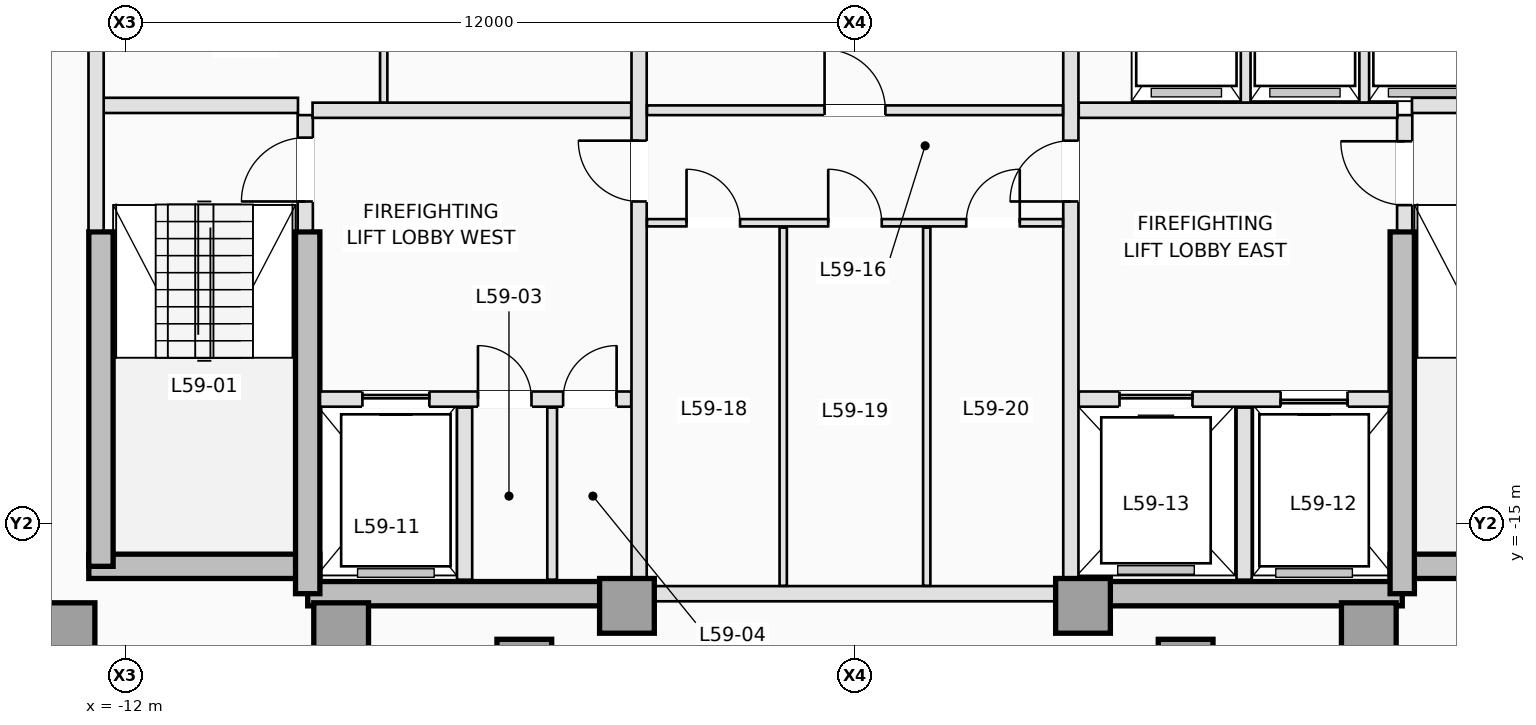
"""IFC4 building model, lengths in metres.
Left out: names, types, materials, properties, quantities, classifications, styles, units other than length and angle.
Written with IfcOpenShell. Run it as: python <this file> out.ifc"""

import sys

from ifc_helpers import new_model, si_unit, direction, frame, frame_2d, origin, origin_2d, place, context, subcontext, project, spatial, rectangle, extrude, element, fill, save


model = new_model("IFC4")
c1 = context("Model", 3, precision=1e-05, world=origin(), true_north=direction((0.0, 1.0)))
c2 = subcontext(c1, "Body", "Model", "MODEL_VIEW")
j1 = project(units=[si_unit("LENGTHUNIT", "METRE"), si_unit("PLANEANGLEUNIT", "RADIAN")], contexts=[c1])
p1 = place(None, origin())
s1 = spatial("IfcSite", under=j1, at=p1, CompositionType="ELEMENT")
p2 = place(p1, origin())
s2 = spatial("IfcBuilding", under=s1, at=p2, CompositionType="ELEMENT")
p3 = place(p2, frame((0.0, 0.0, 214.9)))
s3 = spatial("IfcBuildingStorey", under=s2, at=p3, CompositionType="ELEMENT", Elevation=214.9)
p4 = place(p3, frame((-12.6, -15.7, 0.0), z_axis=(0.0, 0.0, 1.0), x_axis=(1.0, 0.0, 0.0)))
e1 = element("IfcWall", 1, at=p4, inside=s3, PredefinedType="SHEAR", context=c2, shape_type="SweptSolid", body=[
    extrude(rectangle(XDim=3.8, YDim=0.4, at=frame_2d((1.9, 0.0))), origin(), (0.0, 0.0, 1.0), 3.5),
])
for number, where, z_axis, x_axis in (
    (2, (-9.0, -16.15, 0.0), (0.0, 0.0, 1.0), (1.0, 0.0, 0.0)),
    (3, (3.75, -16.15, 0.0), (0.0, 0.0, 1.0), (1.0, 0.0, 0.0)),
):
    element("IfcWall", number, at=place(p3, frame(where, z_axis=z_axis, x_axis=x_axis)), inside=s3, PredefinedType="SHEAR", context=c2, shape_type="SweptSolid", body=[
        extrude(rectangle(XDim=5.25, YDim=0.4, at=frame_2d((2.625, 0.0))), origin(), (0.0, 0.0, 1.0), 3.5),
    ])
p5 = place(p3, frame((8.8, -15.7, 0.0), z_axis=(0.0, 0.0, 1.0), x_axis=(1.0, 0.0, 0.0)))
e4 = element("IfcWall", 4, at=p5, inside=s3, PredefinedType="SHEAR", context=c2, shape_type="SweptSolid", body=[
    extrude(rectangle(XDim=3.8, YDim=0.4, at=frame_2d((1.9, 0.0))), origin(), (0.0, 0.0, 1.0), 3.5),
])
p6 = place(p3, frame((-12.4, -15.7, 0.0), z_axis=(0.0, 0.0, 1.0), x_axis=(0.0, 1.0, 0.0)))
e5 = element("IfcWall", 5, at=p6, inside=s3, PredefinedType="SHEAR", context=c2, shape_type="SweptSolid", body=[
    extrude(rectangle(XDim=5.5, YDim=0.4, at=frame_2d((2.75, 0.0))), origin(), (0.0, 0.0, 1.0), 3.5),
])
for number, where, z_axis, x_axis in (
    (6, (-9.0, -16.15, 0.0), (0.0, 0.0, 1.0), (0.0, 1.0, 0.0)),
    (7, (9.0, -16.15, 0.0), (0.0, 0.0, 1.0), (0.0, 1.0, 0.0)),
):
    element("IfcWall", number, at=place(p3, frame(where, z_axis=z_axis, x_axis=x_axis)), inside=s3, PredefinedType="SHEAR", context=c2, shape_type="SweptSolid", body=[
        extrude(rectangle(XDim=5.95, YDim=0.4, at=frame_2d((2.975, 0.0))), origin(), (0.0, 0.0, 1.0), 3.5),
    ])
for number, where, z_axis, x_axis in (
    (8, (-12.95, -16.75, 0.0), (0.0, 0.0, 1.0), (1.0, 0.0, 0.0)),
    (9, (-8.45, -16.75, 0.0), (0.0, 0.0, 1.0), (1.0, 0.0, 0.0)),
    (10, (-3.75, -16.35, 0.0), (0.0, 0.0, 1.0), (1.0, 0.0, 0.0)),
    (11, (3.75, -16.35, 0.0), (0.0, 0.0, 1.0), (1.0, 0.0, 0.0)),
    (12, (8.45, -16.75, 0.0), (0.0, 0.0, 1.0), (1.0, 0.0, 0.0)),
    (13, (-5.438, -17.35, 0.0), (0.0, 0.0, 1.0), (0.0, 1.0, 0.0)),
    (14, (5.438, -17.35, 0.0), (0.0, 0.0, 1.0), (0.0, 1.0, 0.0)),
):
    element("IfcColumn", number, at=place(p3, frame(where, z_axis=z_axis, x_axis=x_axis)), inside=s3, PredefinedType="COLUMN", context=c2, shape_type="SweptSolid", body=[
        extrude(rectangle(XDim=0.9, YDim=0.9, at=origin_2d()), origin(), (0.0, 0.0, 1.0), 3.5),
    ])
p7 = place(p3, frame((-9.04, -10.18, 0.0), z_axis=(0.0, 0.0, 1.0), x_axis=(0.0, 1.0, 0.0)))
e15 = element("IfcWall", 15, at=p7, inside=s3, PredefinedType="PARTITIONING", context=c2, shape_type="SweptSolid", body=[
    extrude(rectangle(XDim=1.9, YDim=0.25, at=frame_2d((0.95, 0.0))), origin(), (0.0, 0.0, 1.0), 3.25),
])
p8 = place(p7, frame((0.48, 0.0, 0.0)))
e16 = element("IfcOpeningElement", 16, at=p8, cuts=e15, PredefinedType="OPENING", context=c2, shape_type="SweptSolid", body=[
    extrude(rectangle(XDim=1.05, YDim=2.15, at=frame_2d((0.525, 1.075))), frame((0.0, 0.135, 0.0), z_axis=(0.0, -1.0, 0.0), x_axis=(1.0, 0.0, 0.0)), (0.0, 0.0, 1.0), 0.27),
])
p9 = place(p3, frame((9.04, -10.18, 0.0), z_axis=(0.0, 0.0, 1.0), x_axis=(0.0, 1.0, 0.0)))
e17 = element("IfcWall", 17, at=p9, inside=s3, PredefinedType="PARTITIONING", context=c2, shape_type="SweptSolid", body=[
    extrude(rectangle(XDim=1.9, YDim=0.25, at=frame_2d((0.95, 0.0))), origin(), (0.0, 0.0, 1.0), 3.25),
])
p10 = place(p9, frame((0.42, 0.0, 0.0)))
e18 = element("IfcOpeningElement", 18, at=p10, cuts=e17, PredefinedType="OPENING", context=c2, shape_type="SweptSolid", body=[
    extrude(rectangle(XDim=1.05, YDim=2.15, at=frame_2d((0.525, 1.075))), frame((0.0, 0.135, 0.0), z_axis=(0.0, -1.0, 0.0), x_axis=(1.0, 0.0, 0.0)), (0.0, 0.0, 1.0), 0.27),
])
for number, where, z_axis, x_axis in (
    (19, (-12.38, -8.12, 0.0), (0.0, 0.0, 1.0), (1.0, 0.0, 0.0)),
    (20, (9.16, -8.12, 0.0), (0.0, 0.0, 1.0), (1.0, 0.0, 0.0)),
):
    element("IfcWall", number, at=place(p3, frame(where, z_axis=z_axis, x_axis=x_axis)), inside=s3, PredefinedType="PARTITIONING", context=c2, shape_type="SweptSolid", body=[
        extrude(rectangle(XDim=3.22, YDim=0.25, at=frame_2d((1.61, 0.0))), origin(), (0.0, 0.0, 1.0), 3.25),
    ])
p11 = place(p3, frame((-12.48, -10.18, 0.0), z_axis=(0.0, 0.0, 1.0), x_axis=(0.0, 1.0, 0.0)))
e21 = element("IfcWall", 21, at=p11, inside=s3, PredefinedType="PARTITIONING", context=c2, shape_type="SweptSolid", body=[
    extrude(rectangle(XDim=4.84, YDim=0.25, at=frame_2d((2.42, 0.0))), origin(), (0.0, 0.0, 1.0), 3.25),
])
p12 = place(p3, frame((-8.798, -12.95, 0.0), z_axis=(0.0, 0.0, 1.0), x_axis=(1.0, 0.0, 0.0)))
e22 = element("IfcWall", 22, at=p12, inside=s3, PredefinedType="PARTITIONING", context=c2, shape_type="SweptSolid", body=[
    extrude(rectangle(XDim=5.118, YDim=0.25, at=frame_2d((2.559, 0.0))), origin(), (0.0, 0.0, 1.0), 3.25),
])
p13 = place(p12, frame((0.698, 0.0, 0.0)))
e23 = element("IfcOpeningElement", 23, at=p13, cuts=e22, PredefinedType="OPENING", context=c2, shape_type="SweptSolid", body=[
    extrude(rectangle(XDim=1.1, YDim=2.15, at=frame_2d((0.55, 1.075))), frame((0.0, 0.135, 0.0), z_axis=(0.0, -1.0, 0.0), x_axis=(1.0, 0.0, 0.0)), (0.0, 0.0, 1.0), 0.27),
])
p14 = place(p12, frame((2.598, 0.0, 0.0)))
e24 = element("IfcOpeningElement", 24, at=p14, cuts=e22, PredefinedType="OPENING", context=c2, shape_type="SweptSolid", body=[
    extrude(rectangle(XDim=0.88, YDim=2.1, at=frame_2d((0.44, 1.05))), frame((0.0, 0.135, 0.0), z_axis=(0.0, -1.0, 0.0), x_axis=(1.0, 0.0, 0.0)), (0.0, 0.0, 1.0), 0.27),
])
p15 = place(p12, frame((3.998, 0.0, 0.0)))
e25 = element("IfcOpeningElement", 25, at=p15, cuts=e22, PredefinedType="OPENING", context=c2, shape_type="SweptSolid", body=[
    extrude(rectangle(XDim=0.88, YDim=2.1, at=frame_2d((0.44, 1.05))), frame((0.0, 0.135, 0.0), z_axis=(0.0, -1.0, 0.0), x_axis=(1.0, 0.0, 0.0)), (0.0, 0.0, 1.0), 0.27),
])
p16 = place(p3, frame((3.68, -12.95, 0.0), z_axis=(0.0, 0.0, 1.0), x_axis=(1.0, 0.0, 0.0)))
e26 = element("IfcWall", 26, at=p16, inside=s3, PredefinedType="PARTITIONING", context=c2, shape_type="SweptSolid", body=[
    extrude(rectangle(XDim=5.118, YDim=0.25, at=frame_2d((2.559, 0.0))), origin(), (0.0, 0.0, 1.0), 3.25),
])
p17 = place(p16, frame((3.32, 0.0, 0.0)))
e27 = element("IfcOpeningElement", 27, at=p17, cuts=e26, PredefinedType="OPENING", context=c2, shape_type="SweptSolid", body=[
    extrude(rectangle(XDim=1.1, YDim=2.15, at=frame_2d((0.55, 1.075))), frame((0.0, 0.135, 0.0), z_axis=(0.0, -1.0, 0.0), x_axis=(1.0, 0.0, 0.0)), (0.0, 0.0, 1.0), 0.27),
])
p18 = place(p16, frame((0.67, 0.0, 0.0)))
e28 = element("IfcOpeningElement", 28, at=p18, cuts=e26, PredefinedType="OPENING", context=c2, shape_type="SweptSolid", body=[
    extrude(rectangle(XDim=1.2, YDim=2.15, at=frame_2d((0.6, 1.075))), frame((0.0, 0.135, 0.0), z_axis=(0.0, -1.0, 0.0), x_axis=(1.0, 0.0, 0.0)), (0.0, 0.0, 1.0), 0.27),
])
p19 = place(p3, frame((-6.42, -15.92, 0.0), z_axis=(0.0, 0.0, 1.0), x_axis=(0.0, 1.0, 0.0)))
e29 = element("IfcWall", 29, at=p19, inside=s3, PredefinedType="PARTITIONING", context=c2, shape_type="SweptSolid", body=[
    extrude(rectangle(XDim=2.83, YDim=0.25, at=frame_2d((1.415, 0.0))), origin(), (0.0, 0.0, 1.0), 3.25),
])
p20 = place(p3, frame((-4.98, -15.92, 0.0), z_axis=(0.0, 0.0, 1.0), x_axis=(0.0, 1.0, 0.0)))
e30 = element("IfcWall", 30, at=p20, inside=s3, PredefinedType="PARTITIONING", context=c2, shape_type="SweptSolid", body=[
    extrude(rectangle(XDim=2.83, YDim=0.16, at=frame_2d((1.415, 0.0))), origin(), (0.0, 0.0, 1.0), 3.25),
])
p21 = place(p3, frame((6.4, -15.92, 0.0), z_axis=(0.0, 0.0, 1.0), x_axis=(0.0, 1.0, 0.0)))
e31 = element("IfcWall", 31, at=p21, inside=s3, PredefinedType="PARTITIONING", context=c2, shape_type="SweptSolid", body=[
    extrude(rectangle(XDim=2.83, YDim=0.25, at=frame_2d((1.415, 0.0))), origin(), (0.0, 0.0, 1.0), 3.25),
])
for number, where, z_axis, x_axis in (
    (32, (-8.92, -8.2, 0.0), (0.0, 0.0, 1.0), (1.0, 0.0, 0.0)),
    (33, (3.68, -8.2, 0.0), (0.0, 0.0, 1.0), (1.0, 0.0, 0.0)),
):
    element("IfcWall", number, at=place(p3, frame(where, z_axis=z_axis, x_axis=x_axis)), inside=s3, PredefinedType="PARTITIONING", context=c2, shape_type="SweptSolid", body=[
        extrude(rectangle(XDim=5.24, YDim=0.25, at=frame_2d((2.62, 0.0))), origin(), (0.0, 0.0, 1.0), 3.25),
    ])
p22 = place(p3, frame((-3.55, -15.898, 0.0), z_axis=(0.0, 0.0, 1.0), x_axis=(0.0, 1.0, 0.0)))
e34 = element("IfcWall", 34, at=p22, inside=s3, PredefinedType="PARTITIONING", context=c2, shape_type="SweptSolid", body=[
    extrude(rectangle(XDim=10.558, YDim=0.25, at=frame_2d((5.279, 0.0))), origin(), (0.0, 0.0, 1.0), 3.25),
])
p23 = place(p22, frame((6.198, 0.0, 0.0)))
e35 = element("IfcOpeningElement", 35, at=p23, cuts=e34, PredefinedType="OPENING", context=c2, shape_type="SweptSolid", body=[
    extrude(rectangle(XDim=1.0, YDim=2.15, at=frame_2d((0.5, 1.075))), frame((0.0, 0.135, 0.0), z_axis=(0.0, -1.0, 0.0), x_axis=(1.0, 0.0, 0.0)), (0.0, 0.0, 1.0), 0.27),
])
p24 = place(p3, frame((3.55, -15.898, 0.0), z_axis=(0.0, 0.0, 1.0), x_axis=(0.0, 1.0, 0.0)))
e36 = element("IfcWall", 36, at=p24, inside=s3, PredefinedType="PARTITIONING", context=c2, shape_type="SweptSolid", body=[
    extrude(rectangle(XDim=10.558, YDim=0.25, at=frame_2d((5.279, 0.0))), origin(), (0.0, 0.0, 1.0), 3.25),
])
p25 = place(p24, frame((6.198, 0.0, 0.0)))
e37 = element("IfcOpeningElement", 37, at=p25, cuts=e36, PredefinedType="OPENING", context=c2, shape_type="SweptSolid", body=[
    extrude(rectangle(XDim=1.0, YDim=2.15, at=frame_2d((0.5, 1.075))), frame((0.0, 0.135, 0.0), z_axis=(0.0, -1.0, 0.0), x_axis=(1.0, 0.0, 0.0)), (0.0, 0.0, 1.0), 0.27),
])
p26 = place(p3, frame((-7.75, -8.073, 0.0), z_axis=(0.0, 0.0, 1.0), x_axis=(0.0, 1.0, 0.0)))
e38 = element("IfcWall", 38, at=p26, inside=s3, PredefinedType="PARTITIONING", context=c2, shape_type="SweptSolid", body=[
    extrude(rectangle(XDim=2.733, YDim=0.12, at=frame_2d((1.366, 0.0))), origin(), (0.0, 0.0, 1.0), 3.25),
])
for number, where, z_axis, x_axis in (
    (39, (6.425, -8.073, 0.0), (0.0, 0.0, 1.0), (0.0, 1.0, 0.0)),
    (40, (8.375, -8.073, 0.0), (0.0, 0.0, 1.0), (0.0, 1.0, 0.0)),
):
    element("IfcWall", number, at=place(p3, frame(where, z_axis=z_axis, x_axis=x_axis)), inside=s3, PredefinedType="PARTITIONING", context=c2, shape_type="SweptSolid", body=[
        extrude(rectangle(XDim=2.733, YDim=0.16, at=frame_2d((1.366, 0.0))), origin(), (0.0, 0.0, 1.0), 3.25),
    ])
p27 = place(p3, frame((-3.298, -16.15, 0.0), z_axis=(0.0, 0.0, 1.0), x_axis=(1.0, 0.0, 0.0)))
e41 = element("IfcWall", 41, at=p27, inside=s3, PredefinedType="PARTITIONING", context=c2, shape_type="SweptSolid", body=[
    extrude(rectangle(XDim=6.596, YDim=0.25, at=frame_2d((3.298, 0.0))), origin(), (0.0, 0.0, 1.0), 2.45),
])
p28 = place(p3, frame((-3.42, -8.2, 0.0), z_axis=(0.0, 0.0, 1.0), x_axis=(1.0, 0.0, 0.0)))
e42 = element("IfcWall", 42, at=p28, inside=s3, PredefinedType="PARTITIONING", context=c2, shape_type="SweptSolid", body=[
    extrude(rectangle(XDim=6.84, YDim=0.16, at=frame_2d((3.42, 0.0))), origin(), (0.0, 0.0, 1.0), 3.25),
])
p29 = place(p28, frame((2.92, 0.0, 0.0)))
e43 = element("IfcOpeningElement", 43, at=p29, cuts=e42, PredefinedType="OPENING", context=c2, shape_type="SweptSolid", body=[
    extrude(rectangle(XDim=1.0, YDim=2.15, at=frame_2d((0.5, 1.075))), frame((0.0, 0.09, 0.0), z_axis=(0.0, -1.0, 0.0), x_axis=(1.0, 0.0, 0.0)), (0.0, 0.0, 1.0), 0.18),
])
p30 = place(p3, frame((-3.42, -10.05, 0.0), z_axis=(0.0, 0.0, 1.0), x_axis=(1.0, 0.0, 0.0)))
e44 = element("IfcWall", 44, at=p30, inside=s3, PredefinedType="PARTITIONING", context=c2, shape_type="SweptSolid", body=[
    extrude(rectangle(XDim=6.84, YDim=0.12, at=frame_2d((3.42, 0.0))), origin(), (0.0, 0.0, 1.0), 3.25),
])
p31 = place(p30, frame((0.65, 0.0, 0.0)))
e45 = element("IfcOpeningElement", 45, at=p31, cuts=e44, PredefinedType="OPENING", context=c2, shape_type="SweptSolid", body=[
    extrude(rectangle(XDim=0.88, YDim=2.12, at=frame_2d((0.44, 1.06))), frame((0.0, 0.07, 0.0), z_axis=(0.0, -1.0, 0.0), x_axis=(1.0, 0.0, 0.0)), (0.0, 0.0, 1.0), 0.14),
])
p32 = place(p30, frame((2.98, 0.0, 0.0)))
e46 = element("IfcOpeningElement", 46, at=p32, cuts=e44, PredefinedType="OPENING", context=c2, shape_type="SweptSolid", body=[
    extrude(rectangle(XDim=0.88, YDim=2.12, at=frame_2d((0.44, 1.06))), frame((0.0, 0.07, 0.0), z_axis=(0.0, -1.0, 0.0), x_axis=(1.0, 0.0, 0.0)), (0.0, 0.0, 1.0), 0.14),
])
p33 = place(p30, frame((5.25, 0.0, 0.0)))
e47 = element("IfcOpeningElement", 47, at=p33, cuts=e44, PredefinedType="OPENING", context=c2, shape_type="SweptSolid", body=[
    extrude(rectangle(XDim=0.88, YDim=2.12, at=frame_2d((0.44, 1.06))), frame((0.0, 0.07, 0.0), z_axis=(0.0, -1.0, 0.0), x_axis=(1.0, 0.0, 0.0)), (0.0, 0.0, 1.0), 0.14),
])
for number, where, z_axis, x_axis in (
    (48, (-1.18, -16.02, 0.0), (0.0, 0.0, 1.0), (0.0, 1.0, 0.0)),
    (49, (1.18, -16.02, 0.0), (0.0, 0.0, 1.0), (0.0, 1.0, 0.0)),
):
    element("IfcWall", number, at=place(p3, frame(where, z_axis=z_axis, x_axis=x_axis)), inside=s3, PredefinedType="PARTITIONING", context=c2, shape_type="SweptSolid", body=[
        extrude(rectangle(XDim=5.89, YDim=0.12, at=frame_2d((2.945, 0.0))), origin(), (0.0, 0.0, 1.0), 3.25),
    ])
p34 = place(p13, origin())
e50 = element("IfcDoor", 50, at=p34, inside=s3, OperationType="SLIDING_TO_LEFT", PredefinedType="DOOR", context=c2, shape_type="SweptSolid", body=[
    extrude(rectangle(XDim=1.1, YDim=2.15, at=frame_2d((0.55, 1.075))), frame((0.0, 0.025, 0.0), z_axis=(0.0, -1.0, 0.0), x_axis=(1.0, 0.0, 0.0)), (0.0, 0.0, 1.0), 0.05),
])
fill(e23, e50)
p35 = place(p17, origin())
e51 = element("IfcDoor", 51, at=p35, inside=s3, OperationType="SLIDING_TO_RIGHT", PredefinedType="DOOR", context=c2, shape_type="SweptSolid", body=[
    extrude(rectangle(XDim=1.1, YDim=2.15, at=frame_2d((0.55, 1.075))), frame((0.0, 0.025, 0.0), z_axis=(0.0, -1.0, 0.0), x_axis=(1.0, 0.0, 0.0)), (0.0, 0.0, 1.0), 0.05),
])
fill(e27, e51)
p36 = place(p18, origin())
e52 = element("IfcDoor", 52, at=p36, inside=s3, OperationType="SLIDING_TO_LEFT", PredefinedType="DOOR", context=c2, shape_type="SweptSolid", body=[
    extrude(rectangle(XDim=1.2, YDim=2.15, at=frame_2d((0.6, 1.075))), frame((0.0, 0.025, 0.0), z_axis=(0.0, -1.0, 0.0), x_axis=(1.0, 0.0, 0.0)), (0.0, 0.0, 1.0), 0.05),
])
fill(e28, e52)
p37 = place(p8, origin())
e53 = element("IfcDoor", 53, at=p37, inside=s3, OperationType="SINGLE_SWING_LEFT", PredefinedType="DOOR", context=c2, shape_type="SweptSolid", body=[
    extrude(rectangle(XDim=1.05, YDim=2.15, at=frame_2d((0.525, 1.075))), frame((0.0, 0.025, 0.0), z_axis=(0.0, -1.0, 0.0), x_axis=(1.0, 0.0, 0.0)), (0.0, 0.0, 1.0), 0.05),
])
fill(e16, e53)
p38 = place(p10, origin())
e54 = element("IfcDoor", 54, at=p38, inside=s3, OperationType="SINGLE_SWING_RIGHT", PredefinedType="DOOR", context=c2, shape_type="SweptSolid", body=[
    extrude(rectangle(XDim=1.05, YDim=2.15, at=frame_2d((0.525, 1.075))), frame((0.0, 0.025, 0.0), z_axis=(0.0, -1.0, 0.0), x_axis=(1.0, 0.0, 0.0)), (0.0, 0.0, 1.0), 0.05),
])
fill(e18, e54)
p39 = place(p14, origin())
e55 = element("IfcDoor", 55, at=p39, inside=s3, OperationType="SINGLE_SWING_LEFT", PredefinedType="TRAPDOOR", context=c2, shape_type="SweptSolid", body=[
    extrude(rectangle(XDim=0.88, YDim=2.1, at=frame_2d((0.44, 1.05))), frame((0.0, 0.025, 0.0), z_axis=(0.0, -1.0, 0.0), x_axis=(1.0, 0.0, 0.0)), (0.0, 0.0, 1.0), 0.05),
])
fill(e24, e55)
p40 = place(p15, origin())
e56 = element("IfcDoor", 56, at=p40, inside=s3, OperationType="SINGLE_SWING_RIGHT", PredefinedType="TRAPDOOR", context=c2, shape_type="SweptSolid", body=[
    extrude(rectangle(XDim=0.88, YDim=2.1, at=frame_2d((0.44, 1.05))), frame((0.0, 0.025, 0.0), z_axis=(0.0, -1.0, 0.0), x_axis=(1.0, 0.0, 0.0)), (0.0, 0.0, 1.0), 0.05),
])
fill(e25, e56)
p41 = place(p23, origin())
e57 = element("IfcDoor", 57, at=p41, inside=s3, OperationType="SINGLE_SWING_RIGHT", PredefinedType="DOOR", context=c2, shape_type="SweptSolid", body=[
    extrude(rectangle(XDim=1.0, YDim=2.15, at=frame_2d((0.5, 1.075))), frame((0.0, 0.025, 0.0), z_axis=(0.0, -1.0, 0.0), x_axis=(1.0, 0.0, 0.0)), (0.0, 0.0, 1.0), 0.05),
])
fill(e35, e57)
p42 = place(p25, origin())
e58 = element("IfcDoor", 58, at=p42, inside=s3, OperationType="SINGLE_SWING_LEFT", PredefinedType="DOOR", context=c2, shape_type="SweptSolid", body=[
    extrude(rectangle(XDim=1.0, YDim=2.15, at=frame_2d((0.5, 1.075))), frame((0.0, 0.025, 0.0), z_axis=(0.0, -1.0, 0.0), x_axis=(1.0, 0.0, 0.0)), (0.0, 0.0, 1.0), 0.05),
])
fill(e37, e58)
p43 = place(p29, origin())
e59 = element("IfcDoor", 59, at=p43, inside=s3, OperationType="SINGLE_SWING_LEFT", PredefinedType="DOOR", context=c2, shape_type="SweptSolid", body=[
    extrude(rectangle(XDim=1.0, YDim=2.15, at=frame_2d((0.5, 1.075))), frame((0.0, 0.025, 0.0), z_axis=(0.0, -1.0, 0.0), x_axis=(1.0, 0.0, 0.0)), (0.0, 0.0, 1.0), 0.05),
])
fill(e43, e59)
p44 = place(p31, origin())
e60 = element("IfcDoor", 60, at=p44, inside=s3, OperationType="SINGLE_SWING_LEFT", PredefinedType="DOOR", context=c2, shape_type="SweptSolid", body=[
    extrude(rectangle(XDim=0.88, YDim=2.12, at=frame_2d((0.44, 1.06))), frame((0.0, 0.025, 0.0), z_axis=(0.0, -1.0, 0.0), x_axis=(1.0, 0.0, 0.0)), (0.0, 0.0, 1.0), 0.05),
])
fill(e45, e60)
p45 = place(p32, origin())
e61 = element("IfcDoor", 61, at=p45, inside=s3, OperationType="SINGLE_SWING_LEFT", PredefinedType="DOOR", context=c2, shape_type="SweptSolid", body=[
    extrude(rectangle(XDim=0.88, YDim=2.12, at=frame_2d((0.44, 1.06))), frame((0.0, 0.025, 0.0), z_axis=(0.0, -1.0, 0.0), x_axis=(1.0, 0.0, 0.0)), (0.0, 0.0, 1.0), 0.05),
])
fill(e46, e61)
p46 = place(p33, origin())
e62 = element("IfcDoor", 62, at=p46, inside=s3, OperationType="SINGLE_SWING_RIGHT", PredefinedType="DOOR", context=c2, shape_type="SweptSolid", body=[
    extrude(rectangle(XDim=0.88, YDim=2.12, at=frame_2d((0.44, 1.06))), frame((0.0, 0.025, 0.0), z_axis=(0.0, -1.0, 0.0), x_axis=(1.0, 0.0, 0.0)), (0.0, 0.0, 1.0), 0.05),
])
fill(e47, e62)
save(model, sys.argv[1])
